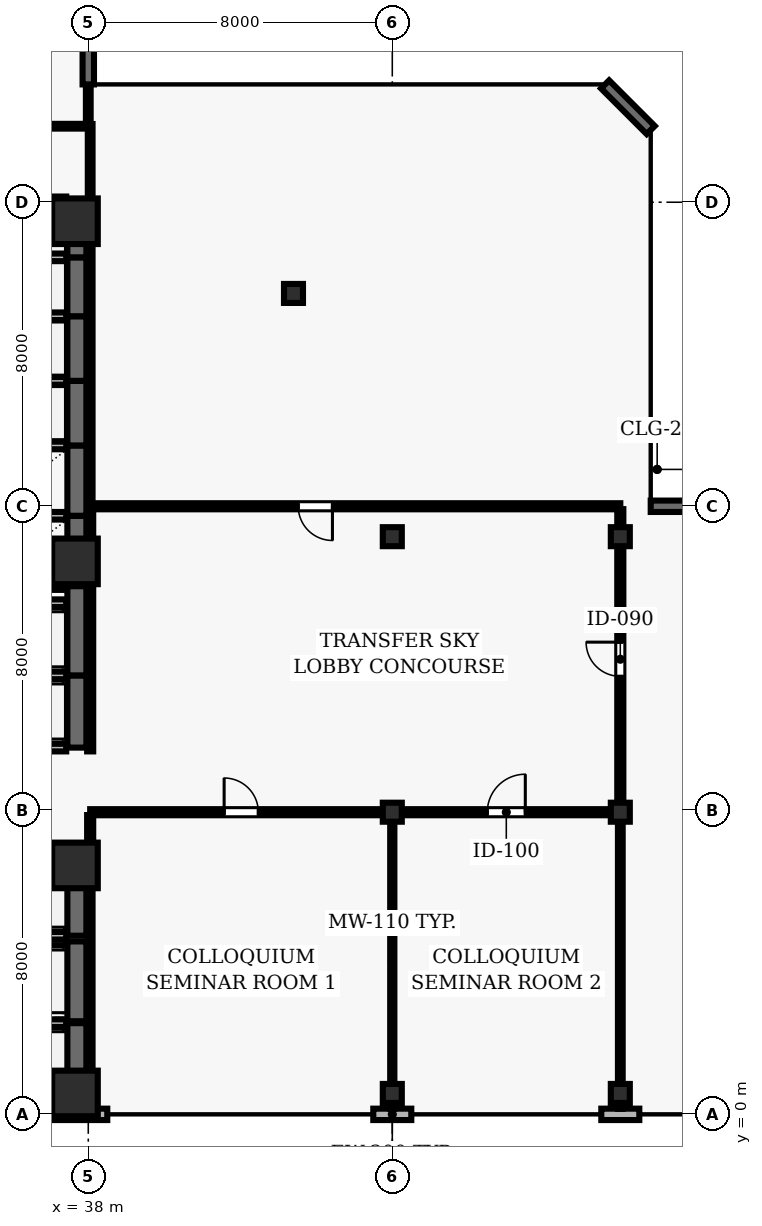
"""IFC4 building model, lengths in metres.
Left out: names, types, materials, properties, quantities, classifications, styles, units other than length and angle.
Written with IfcOpenShell. Run it as: python <this file> out.ifc"""

import sys

from ifc_helpers import new_model, si_unit, direction, frame, frame_2d, origin, origin_2d, place, context, subcontext, project, spatial, rectangle, hollow_rectangle, extrude, element, fill, save


model = new_model("IFC4")
c1 = context("Model", 3, precision=1e-05, world=origin(), true_north=direction((0.0, 1.0)))
c2 = subcontext(c1, "Body", "Model", "MODEL_VIEW")
j1 = project(units=[si_unit("LENGTHUNIT", "METRE"), si_unit("PLANEANGLEUNIT", "RADIAN")], contexts=[c1])
p1 = place(None, origin())
s1 = spatial("IfcSite", under=j1, at=p1, CompositionType="ELEMENT")
p2 = place(p1, origin())
s2 = spatial("IfcBuilding", under=s1, at=p2, CompositionType="ELEMENT")
p3 = place(p2, frame((0.0, 0.0, 98.4)))
s3 = spatial("IfcBuildingStorey", under=s2, at=p3, CompositionType="ELEMENT", Elevation=98.4)
for number, where, z_axis, x_axis in (
    (1, (37.65, 0.55, 0.0), (0.0, 0.0, 1.0), (1.0, 0.0, 0.0)),
    (2, (37.65, 6.55, 0.0), (0.0, 0.0, 1.0), (1.0, 0.0, 0.0)),
    (3, (37.65, 14.55, 0.0), (0.0, 0.0, 1.0), (1.0, 0.0, 0.0)),
    (4, (37.65, 23.5, 0.0), (0.0, 0.0, 1.0), (1.0, 0.0, 0.0)),
):
    element("IfcColumn", number, at=place(p3, frame(where, z_axis=z_axis, x_axis=x_axis)), inside=s3, PredefinedType="COLUMN", context=c2, shape_type="SweptSolid", body=[
        extrude(rectangle(XDim=1.2, YDim=1.2, at=origin_2d()), origin(), (0.0, 0.0, 1.0), 5.0),
    ])
for number, where, z_axis, x_axis in (
    (5, (46.0, 0.55, 0.0), (0.0, 0.0, 1.0), (1.0, 0.0, 0.0)),
    (6, (46.0, 7.95, 0.0), (0.0, 0.0, 1.0), (1.0, 0.0, 0.0)),
    (7, (46.0, 15.2, 0.0), (0.0, 0.0, 1.0), (1.0, 0.0, 0.0)),
    (8, (52.0, 0.55, 0.0), (0.0, 0.0, 1.0), (1.0, 0.0, 0.0)),
    (9, (52.0, 7.95, 0.0), (0.0, 0.0, 1.0), (1.0, 0.0, 0.0)),
    (10, (52.0, 15.2, 0.0), (0.0, 0.0, 1.0), (1.0, 0.0, 0.0)),
    (11, (43.4, 21.6, 0.0), (0.0, 0.0, 1.0), (1.0, 0.0, 0.0)),
):
    element("IfcColumn", number, at=place(p3, frame(where, z_axis=z_axis, x_axis=x_axis)), inside=s3, PredefinedType="COLUMN", context=c2, shape_type="SweptSolid", body=[
        extrude(hollow_rectangle(XDim=0.5, YDim=0.5, WallThickness=0.025, at=origin_2d()), origin(), (0.0, 0.0, 1.0), 5.0),
    ])
p4 = place(p3, frame((30.9, 0.0, 0.0), z_axis=(0.0, 0.0, 1.0), x_axis=(1.0, 0.0, 0.0)))
e12 = element("IfcWall", 12, at=p4, inside=s3, PredefinedType="SOLIDWALL", context=c2, shape_type="SweptSolid", body=[
    extrude(rectangle(XDim=7.6, YDim=0.3, at=frame_2d((3.8, 0.0))), origin(), (0.0, 0.0, 1.0), 4.79),
])
for number, where, z_axis, x_axis in (
    (13, (45.5, 0.0, 0.0), (0.0, 0.0, 1.0), (1.0, 0.0, 0.0)),
    (14, (51.5, 0.0, 0.0), (0.0, 0.0, 1.0), (1.0, 0.0, 0.0)),
):
    element("IfcWall", number, at=place(p3, frame(where, z_axis=z_axis, x_axis=x_axis)), inside=s3, PredefinedType="SOLIDWALL", context=c2, shape_type="SweptSolid", body=[
        extrude(rectangle(XDim=1.0, YDim=0.3, at=frame_2d((0.5, 0.0))), origin(), (0.0, 0.0, 1.0), 4.79),
    ])
p5 = place(p3, frame((68.1, 16.0, 0.0), z_axis=(0.0, 0.0, 1.0), x_axis=(-1.0, 0.0, 0.0)))
e15 = element("IfcWall", 15, at=p5, inside=s3, PredefinedType="SOLIDWALL", context=c2, shape_type="SweptSolid", body=[
    extrude(rectangle(XDim=15.3, YDim=0.3, at=frame_2d((7.65, 0.0))), origin(), (0.0, 0.0, 1.0), 4.79),
])
p6 = place(p5, frame((7.05, 0.0, 0.0)))
e16 = element("IfcOpeningElement", 16, at=p6, cuts=e15, PredefinedType="OPENING", context=c2, shape_type="SweptSolid", body=[
    extrude(rectangle(XDim=1.0, YDim=2.2, at=frame_2d((0.5, 1.1))), frame((0.0, 0.16, 0.0), z_axis=(0.0, -1.0, 0.0), x_axis=(1.0, 0.0, 0.0)), (0.0, 0.0, 1.0), 0.32),
])
p7 = place(p5, frame((2.775, 0.0, 0.9)))
e17 = element("IfcOpeningElement", 17, at=p7, cuts=e15, PredefinedType="OPENING", context=c2, shape_type="SweptSolid", body=[
    extrude(rectangle(XDim=2.1, YDim=1.6, at=frame_2d((1.05, 0.8))), frame((0.0, 0.16, 0.0), z_axis=(0.0, -1.0, 0.0), x_axis=(1.0, 0.0, 0.0)), (0.0, 0.0, 1.0), 0.32),
])
p8 = place(p5, frame((10.425, 0.0, 0.9)))
e18 = element("IfcOpeningElement", 18, at=p8, cuts=e15, PredefinedType="OPENING", context=c2, shape_type="SweptSolid", body=[
    extrude(rectangle(XDim=2.1, YDim=1.6, at=frame_2d((1.05, 0.8))), frame((0.0, 0.16, 0.0), z_axis=(0.0, -1.0, 0.0), x_axis=(1.0, 0.0, 0.0)), (0.0, 0.0, 1.0), 0.32),
])
p9 = place(p3, frame((52.8, 25.9, 0.0), z_axis=(0.0, 0.0, 1.0), x_axis=(-0.707034851297, 0.707178703759, 0.0)))
e19 = element("IfcWall", 19, at=p9, inside=s3, PredefinedType="SOLIDWALL", context=c2, shape_type="SweptSolid", body=[
    extrude(rectangle(XDim=1.697, YDim=0.3, at=frame_2d((0.849, 0.0))), origin(), (0.0, 0.0, 1.0), 4.79),
])
p10 = place(p3, frame((38.0, 27.1, 0.0), z_axis=(0.0, 0.0, 1.0), x_axis=(0.0, 1.0, 0.0)))
e20 = element("IfcWall", 20, at=p10, inside=s3, PredefinedType="SOLIDWALL", context=c2, shape_type="SweptSolid", body=[
    extrude(rectangle(XDim=19.0, YDim=0.3, at=frame_2d((9.5, 0.0))), origin(), (0.0, 0.0, 1.0), 4.79),
])
p11 = place(p10, frame((10.2, 0.0, 0.0)))
e21 = element("IfcOpeningElement", 21, at=p11, cuts=e20, PredefinedType="OPENING", context=c2, shape_type="SweptSolid", body=[
    extrude(rectangle(XDim=1.0, YDim=2.2, at=frame_2d((0.5, 1.1))), frame((0.0, 0.16, 0.0), z_axis=(0.0, -1.0, 0.0), x_axis=(1.0, 0.0, 0.0)), (0.0, 0.0, 1.0), 0.32),
])
p12 = place(p10, frame((14.633, 0.0, 0.9)))
e22 = element("IfcOpeningElement", 22, at=p12, cuts=e20, PredefinedType="OPENING", context=c2, shape_type="SweptSolid", body=[
    extrude(rectangle(XDim=2.4, YDim=1.8, at=frame_2d((1.2, 0.9))), frame((0.0, 0.16, 0.0), z_axis=(0.0, -1.0, 0.0), x_axis=(1.0, 0.0, 0.0)), (0.0, 0.0, 1.0), 0.32),
])
p13 = place(p3, frame((37.7, 0.3, 0.0), z_axis=(0.0, 0.0, 1.0), x_axis=(0.0, 1.0, 0.0)))
e23 = element("IfcWall", 23, at=p13, inside=s3, PredefinedType="SHEAR", context=c2, shape_type="SweptSolid", body=[
    extrude(rectangle(XDim=2.1, YDim=0.5, at=frame_2d((1.05, 0.0))), origin(), (0.0, 0.0, 1.0), 4.79),
])
for number, where, z_axis, x_axis in (
    (24, (35.28, 0.3, 0.0), (0.0, 0.0, 1.0), (1.0, 0.0, 0.0)),
    (25, (37.42, 2.4, 0.0), (0.0, 0.0, 1.0), (-1.0, 0.0, 0.0)),
):
    element("IfcWall", number, at=place(p3, frame(where, z_axis=z_axis, x_axis=x_axis)), inside=s3, PredefinedType="SOLIDWALL", context=c2, shape_type="SweptSolid", body=[
        extrude(rectangle(XDim=2.14, YDim=0.2, at=frame_2d((1.07, 0.0))), origin(), (0.0, 0.0, 1.0), 4.79),
    ])
p14 = place(p3, frame((37.7, 2.45, 0.0), z_axis=(0.0, 0.0, 1.0), x_axis=(0.0, 1.0, 0.0)))
e26 = element("IfcWall", 26, at=p14, inside=s3, PredefinedType="SHEAR", context=c2, shape_type="SweptSolid", body=[
    extrude(rectangle(XDim=2.1, YDim=0.5, at=frame_2d((1.05, 0.0))), origin(), (0.0, 0.0, 1.0), 4.79),
])
p15 = place(p3, frame((37.42, 4.55, 0.0), z_axis=(0.0, 0.0, 1.0), x_axis=(-1.0, 0.0, 0.0)))
e27 = element("IfcWall", 27, at=p15, inside=s3, PredefinedType="SOLIDWALL", context=c2, shape_type="SweptSolid", body=[
    extrude(rectangle(XDim=2.14, YDim=0.2, at=frame_2d((1.07, 0.0))), origin(), (0.0, 0.0, 1.0), 4.79),
])
p16 = place(p3, frame((37.7, 4.7, 0.0), z_axis=(0.0, 0.0, 1.0), x_axis=(0.0, 1.0, 0.0)))
e28 = element("IfcWall", 28, at=p16, inside=s3, PredefinedType="SHEAR", context=c2, shape_type="SweptSolid", body=[
    extrude(rectangle(XDim=2.25, YDim=0.5, at=frame_2d((1.125, 0.0))), origin(), (0.0, 0.0, 1.0), 4.79),
])
for number, where, z_axis, x_axis in (
    (29, (35.28, 4.7, 0.0), (0.0, 0.0, 1.0), (1.0, 0.0, 0.0)),
    (30, (37.42, 6.95, 0.0), (0.0, 0.0, 1.0), (-1.0, 0.0, 0.0)),
):
    element("IfcWall", number, at=place(p3, frame(where, z_axis=z_axis, x_axis=x_axis)), inside=s3, PredefinedType="SOLIDWALL", context=c2, shape_type="SweptSolid", body=[
        extrude(rectangle(XDim=2.14, YDim=0.2, at=frame_2d((1.07, 0.0))), origin(), (0.0, 0.0, 1.0), 4.79),
    ])
p17 = place(p3, frame((37.7, 9.65, 0.0), z_axis=(0.0, 0.0, 1.0), x_axis=(0.0, 1.0, 0.0)))
e31 = element("IfcWall", 31, at=p17, inside=s3, PredefinedType="SHEAR", context=c2, shape_type="SweptSolid", body=[
    extrude(rectangle(XDim=1.9, YDim=0.5, at=frame_2d((0.95, 0.0))), origin(), (0.0, 0.0, 1.0), 4.79),
])
for number, where, z_axis, x_axis in (
    (32, (35.28, 9.65, 0.0), (0.0, 0.0, 1.0), (1.0, 0.0, 0.0)),
    (33, (37.42, 11.55, 0.0), (0.0, 0.0, 1.0), (-1.0, 0.0, 0.0)),
):
    element("IfcWall", number, at=place(p3, frame(where, z_axis=z_axis, x_axis=x_axis)), inside=s3, PredefinedType="SOLIDWALL", context=c2, shape_type="SweptSolid", body=[
        extrude(rectangle(XDim=2.14, YDim=0.2, at=frame_2d((1.07, 0.0))), origin(), (0.0, 0.0, 1.0), 4.79),
    ])
p18 = place(p3, frame((37.7, 11.55, 0.0), z_axis=(0.0, 0.0, 1.0), x_axis=(0.0, 1.0, 0.0)))
e34 = element("IfcWall", 34, at=p18, inside=s3, PredefinedType="SHEAR", context=c2, shape_type="SweptSolid", body=[
    extrude(rectangle(XDim=2.35, YDim=0.5, at=frame_2d((1.175, 0.0))), origin(), (0.0, 0.0, 1.0), 4.79),
])
p19 = place(p3, frame((37.42, 13.45, 0.0), z_axis=(0.0, 0.0, 1.0), x_axis=(-1.0, 0.0, 0.0)))
e35 = element("IfcWall", 35, at=p19, inside=s3, PredefinedType="SOLIDWALL", context=c2, shape_type="SweptSolid", body=[
    extrude(rectangle(XDim=2.14, YDim=0.2, at=frame_2d((1.07, 0.0))), origin(), (0.0, 0.0, 1.0), 4.79),
])
p20 = place(p3, frame((37.7, 13.9, 0.0), z_axis=(0.0, 0.0, 1.0), x_axis=(0.0, 1.0, 0.0)))
e36 = element("IfcWall", 36, at=p20, inside=s3, PredefinedType="SHEAR", context=c2, shape_type="SweptSolid", body=[
    extrude(rectangle(XDim=1.85, YDim=0.5, at=frame_2d((0.925, 0.0))), origin(), (0.0, 0.0, 1.0), 4.79),
])
for number, where, z_axis, x_axis in (
    (37, (35.28, 13.9, 0.0), (0.0, 0.0, 1.0), (1.0, 0.0, 0.0)),
    (38, (37.42, 15.75, 0.0), (0.0, 0.0, 1.0), (-1.0, 0.0, 0.0)),
):
    element("IfcWall", number, at=place(p3, frame(where, z_axis=z_axis, x_axis=x_axis)), inside=s3, PredefinedType="SOLIDWALL", context=c2, shape_type="SweptSolid", body=[
        extrude(rectangle(XDim=2.14, YDim=0.2, at=frame_2d((1.07, 0.0))), origin(), (0.0, 0.0, 1.0), 4.79),
    ])
p21 = place(p3, frame((37.7, 15.75, 0.0), z_axis=(0.0, 0.0, 1.0), x_axis=(0.0, 1.0, 0.0)))
e39 = element("IfcWall", 39, at=p21, inside=s3, PredefinedType="SHEAR", context=c2, shape_type="SweptSolid", body=[
    extrude(rectangle(XDim=1.85, YDim=0.5, at=frame_2d((0.925, 0.0))), origin(), (0.0, 0.0, 1.0), 4.79),
])
p22 = place(p3, frame((37.42, 17.6, 0.0), z_axis=(0.0, 0.0, 1.0), x_axis=(-1.0, 0.0, 0.0)))
e40 = element("IfcWall", 40, at=p22, inside=s3, PredefinedType="SOLIDWALL", context=c2, shape_type="SweptSolid", body=[
    extrude(rectangle(XDim=2.14, YDim=0.2, at=frame_2d((1.07, 0.0))), origin(), (0.0, 0.0, 1.0), 4.79),
])
p23 = place(p3, frame((37.7, 17.6, 0.0), z_axis=(0.0, 0.0, 1.0), x_axis=(0.0, 1.0, 0.0)))
e41 = element("IfcWall", 41, at=p23, inside=s3, PredefinedType="SHEAR", context=c2, shape_type="SweptSolid", body=[
    extrude(rectangle(XDim=1.7, YDim=0.5, at=frame_2d((0.85, 0.0))), origin(), (0.0, 0.0, 1.0), 4.79),
])
p24 = place(p3, frame((37.42, 19.3, 0.0), z_axis=(0.0, 0.0, 1.0), x_axis=(-1.0, 0.0, 0.0)))
e42 = element("IfcWall", 42, at=p24, inside=s3, PredefinedType="SOLIDWALL", context=c2, shape_type="SweptSolid", body=[
    extrude(rectangle(XDim=2.14, YDim=0.2, at=frame_2d((1.07, 0.0))), origin(), (0.0, 0.0, 1.0), 4.79),
])
p25 = place(p3, frame((37.7, 19.3, 0.0), z_axis=(0.0, 0.0, 1.0), x_axis=(0.0, 1.0, 0.0)))
e43 = element("IfcWall", 43, at=p25, inside=s3, PredefinedType="SHEAR", context=c2, shape_type="SweptSolid", body=[
    extrude(rectangle(XDim=1.7, YDim=0.5, at=frame_2d((0.85, 0.0))), origin(), (0.0, 0.0, 1.0), 4.79),
])
p26 = place(p3, frame((37.42, 21.0, 0.0), z_axis=(0.0, 0.0, 1.0), x_axis=(-1.0, 0.0, 0.0)))
e44 = element("IfcWall", 44, at=p26, inside=s3, PredefinedType="SOLIDWALL", context=c2, shape_type="SweptSolid", body=[
    extrude(rectangle(XDim=2.14, YDim=0.2, at=frame_2d((1.07, 0.0))), origin(), (0.0, 0.0, 1.0), 4.79),
])
p27 = place(p3, frame((37.7, 21.0, 0.0), z_axis=(0.0, 0.0, 1.0), x_axis=(0.0, 1.0, 0.0)))
e45 = element("IfcWall", 45, at=p27, inside=s3, PredefinedType="SHEAR", context=c2, shape_type="SweptSolid", body=[
    extrude(rectangle(XDim=1.55, YDim=0.5, at=frame_2d((0.775, 0.0))), origin(), (0.0, 0.0, 1.0), 4.79),
])
p28 = place(p3, frame((37.42, 22.55, 0.0), z_axis=(0.0, 0.0, 1.0), x_axis=(-1.0, 0.0, 0.0)))
e46 = element("IfcWall", 46, at=p28, inside=s3, PredefinedType="SOLIDWALL", context=c2, shape_type="SweptSolid", body=[
    extrude(rectangle(XDim=2.14, YDim=0.2, at=frame_2d((1.07, 0.0))), origin(), (0.0, 0.0, 1.0), 4.79),
])
p29 = place(p3, frame((37.7, 22.55, 0.0), z_axis=(0.0, 0.0, 1.0), x_axis=(0.0, 1.0, 0.0)))
e47 = element("IfcWall", 47, at=p29, inside=s3, PredefinedType="SHEAR", context=c2, shape_type="SweptSolid", body=[
    extrude(rectangle(XDim=1.5, YDim=0.5, at=frame_2d((0.75, 0.0))), origin(), (0.0, 0.0, 1.0), 4.79),
])
p30 = place(p3, frame((37.42, 24.05, 0.0), z_axis=(0.0, 0.0, 1.0), x_axis=(-1.0, 0.0, 0.0)))
e48 = element("IfcWall", 48, at=p30, inside=s3, PredefinedType="SOLIDWALL", context=c2, shape_type="SweptSolid", body=[
    extrude(rectangle(XDim=2.14, YDim=0.2, at=frame_2d((1.07, 0.0))), origin(), (0.0, 0.0, 1.0), 4.79),
])
p31 = place(p3, frame((35.15, 26.0, 0.0), z_axis=(0.0, 0.0, 1.0), x_axis=(1.0, 0.0, 0.0)))
e49 = element("IfcWall", 49, at=p31, inside=s3, PredefinedType="PARTITIONING", context=c2, shape_type="SweptSolid", body=[
    extrude(rectangle(XDim=2.85, YDim=0.125, at=frame_2d((1.425, 0.0))), origin(), (0.0, 0.0, 1.0), 4.79),
])
p32 = place(p3, frame((38.05, 7.95, 0.0), z_axis=(0.0, 0.0, 1.0), x_axis=(1.0, 0.0, 0.0)))
e50 = element("IfcWall", 50, at=p32, inside=s3, PredefinedType="PARTITIONING", context=c2, shape_type="SweptSolid", body=[
    extrude(rectangle(XDim=7.95, YDim=0.16, at=frame_2d((3.975, 0.0))), origin(), (0.0, 0.0, 1.0), 4.173),
])
p33 = place(p32, frame((3.525, 0.0, 0.0)))
e51 = element("IfcOpeningElement", 51, at=p33, cuts=e50, PredefinedType="OPENING", context=c2, shape_type="SweptSolid", body=[
    extrude(rectangle(XDim=0.9, YDim=2.1, at=frame_2d((0.45, 1.05))), frame((0.0, 0.09, 0.0), z_axis=(0.0, -1.0, 0.0), x_axis=(1.0, 0.0, 0.0)), (0.0, 0.0, 1.0), 0.18),
])
p34 = place(p3, frame((46.0, 7.95, 0.0), z_axis=(0.0, 0.0, 1.0), x_axis=(1.0, 0.0, 0.0)))
e52 = element("IfcWall", 52, at=p34, inside=s3, PredefinedType="PARTITIONING", context=c2, shape_type="SweptSolid", body=[
    extrude(rectangle(XDim=6.0, YDim=0.16, at=frame_2d((3.0, 0.0))), origin(), (0.0, 0.0, 1.0), 4.173),
])
p35 = place(p34, frame((2.5, 0.0, 0.0)))
e53 = element("IfcOpeningElement", 53, at=p35, cuts=e52, PredefinedType="OPENING", context=c2, shape_type="SweptSolid", body=[
    extrude(rectangle(XDim=1.0, YDim=2.1, at=frame_2d((0.5, 1.05))), frame((0.0, 0.09, 0.0), z_axis=(0.0, -1.0, 0.0), x_axis=(1.0, 0.0, 0.0)), (0.0, 0.0, 1.0), 0.18),
])
p36 = place(p3, frame((52.0, 16.0, 0.0), z_axis=(0.0, 0.0, 1.0), x_axis=(-1.0, 0.0, 0.0)))
e54 = element("IfcWall", 54, at=p36, inside=s3, PredefinedType="PARTITIONING", context=c2, shape_type="SweptSolid", body=[
    extrude(rectangle(XDim=13.95, YDim=0.16, at=frame_2d((6.975, 0.0))), origin(), (0.0, 0.0, 1.0), 4.49),
])
p37 = place(p36, frame((7.575, 0.0, 0.0)))
e55 = element("IfcOpeningElement", 55, at=p37, cuts=e54, PredefinedType="OPENING", context=c2, shape_type="SweptSolid", body=[
    extrude(rectangle(XDim=0.9, YDim=2.1, at=frame_2d((0.45, 1.05))), frame((0.0, 0.09, 0.0), z_axis=(0.0, -1.0, 0.0), x_axis=(1.0, 0.0, 0.0)), (0.0, 0.0, 1.0), 0.18),
])
p38 = place(p3, frame((38.0, 26.058, 0.0), z_axis=(0.0, 0.0, 1.0), x_axis=(0.0, 1.0, 0.0)))
e56 = element("IfcWall", 56, at=p38, inside=s3, PredefinedType="PARTITIONING", context=c2, shape_type="SweptSolid", body=[
    extrude(rectangle(XDim=0.962, YDim=0.125, at=frame_2d((0.481, 0.0))), origin(), (0.0, 0.0, 1.0), 4.173),
])
p39 = place(p3, frame((38.05, 7.05, 0.0), z_axis=(0.0, 0.0, 1.0), x_axis=(0.0, 1.0, 0.0)))
e57 = element("IfcWall", 57, at=p39, inside=s3, PredefinedType="PARTITIONING", context=c2, shape_type="SweptSolid", body=[
    extrude(rectangle(XDim=0.825, YDim=0.16, at=frame_2d((0.413, 0.0))), origin(), (0.0, 0.0, 1.0), 4.173),
])
p40 = place(p3, frame((38.05, 7.05, 0.0), z_axis=(0.0, 0.0, 1.0), x_axis=(0.0, -1.0, 0.0)))
e58 = element("IfcWall", 58, at=p40, inside=s3, PredefinedType="PARTITIONING", context=c2, shape_type="SweptSolid", body=[
    extrude(rectangle(XDim=6.905, YDim=0.125, at=frame_2d((3.453, 0.0))), origin(), (0.0, 0.0, 1.0), 4.173),
])
p41 = place(p3, frame((38.05, 15.925, 0.0), z_axis=(0.0, 0.0, 1.0), x_axis=(0.0, -1.0, 0.0)))
e59 = element("IfcWall", 59, at=p41, inside=s3, PredefinedType="PARTITIONING", context=c2, shape_type="SweptSolid", body=[
    extrude(rectangle(XDim=6.375, YDim=0.16, at=frame_2d((3.188, 0.0))), origin(), (0.0, 0.0, 1.0), 4.173),
])
p42 = place(p3, frame((38.05, 26.058, 0.0), z_axis=(0.0, 0.0, 1.0), x_axis=(0.0, -1.0, 0.0)))
e60 = element("IfcWall", 60, at=p42, inside=s3, PredefinedType="PARTITIONING", context=c2, shape_type="SweptSolid", body=[
    extrude(rectangle(XDim=9.983, YDim=0.125, at=frame_2d((4.992, 0.0))), origin(), (0.0, 0.0, 1.0), 4.173),
])
p43 = place(p3, frame((46.0, 0.145, 0.0), z_axis=(0.0, 0.0, 1.0), x_axis=(0.0, 1.0, 0.0)))
e61 = element("IfcWall", 61, at=p43, inside=s3, PredefinedType="MOVABLE", context=c2, shape_type="SweptSolid", body=[
    extrude(rectangle(XDim=7.73, YDim=0.11, at=frame_2d((3.865, 0.0))), origin(), (0.0, 0.0, 1.0), 4.173),
])
p44 = place(p3, frame((52.0, 7.875, 0.0), z_axis=(0.0, 0.0, 1.0), x_axis=(0.0, -1.0, 0.0)))
e62 = element("IfcWall", 62, at=p44, inside=s3, PredefinedType="PARTITIONING", context=c2, shape_type="SweptSolid", body=[
    extrude(rectangle(XDim=7.73, YDim=0.125, at=frame_2d((3.865, 0.0))), origin(), (0.0, 0.0, 1.0), 4.173),
])
p45 = place(p3, frame((52.0, 8.025, 0.0), z_axis=(0.0, 0.0, 1.0), x_axis=(0.0, 1.0, 0.0)))
e63 = element("IfcWall", 63, at=p45, inside=s3, PredefinedType="PARTITIONING", context=c2, shape_type="SweptSolid", body=[
    extrude(rectangle(XDim=7.9, YDim=0.16, at=frame_2d((3.95, 0.0))), origin(), (0.0, 0.0, 1.0), 4.173),
])
p46 = place(p45, frame((3.5, 0.0, 0.0)))
e64 = element("IfcOpeningElement", 64, at=p46, cuts=e63, PredefinedType="OPENING", context=c2, shape_type="SweptSolid", body=[
    extrude(rectangle(XDim=0.9, YDim=2.1, at=frame_2d((0.45, 1.05))), frame((0.0, 0.09, 0.0), z_axis=(0.0, -1.0, 0.0), x_axis=(1.0, 0.0, 0.0)), (0.0, 0.0, 1.0), 0.18),
])
p47 = place(p46, origin())
e65 = element("IfcDoor", 65, at=p47, inside=s3, OperationType="SINGLE_SWING_RIGHT", PredefinedType="DOOR", context=c2, shape_type="SweptSolid", body=[
    extrude(rectangle(XDim=0.9, YDim=2.1, at=frame_2d((0.45, 1.05))), frame((0.0, 0.025, 0.0), z_axis=(0.0, -1.0, 0.0), x_axis=(1.0, 0.0, 0.0)), (0.0, 0.0, 1.0), 0.05),
])
fill(e64, e65)
p48 = place(p33, origin())
e66 = element("IfcDoor", 66, at=p48, inside=s3, OperationType="SINGLE_SWING_LEFT", PredefinedType="DOOR", context=c2, shape_type="SweptSolid", body=[
    extrude(rectangle(XDim=0.9, YDim=2.1, at=frame_2d((0.45, 1.05))), frame((0.0, 0.025, 0.0), z_axis=(0.0, -1.0, 0.0), x_axis=(1.0, 0.0, 0.0)), (0.0, 0.0, 1.0), 0.05),
])
fill(e51, e66)
p49 = place(p35, origin())
e67 = element("IfcDoor", 67, at=p49, inside=s3, OperationType="SINGLE_SWING_RIGHT", PredefinedType="DOOR", context=c2, shape_type="SweptSolid", body=[
    extrude(rectangle(XDim=1.0, YDim=2.1, at=frame_2d((0.5, 1.05))), frame((0.0, 0.025, 0.0), z_axis=(0.0, -1.0, 0.0), x_axis=(1.0, 0.0, 0.0)), (0.0, 0.0, 1.0), 0.05),
])
fill(e53, e67)
p50 = place(p37, origin())
e68 = element("IfcDoor", 68, at=p50, inside=s3, OperationType="SINGLE_SWING_LEFT", PredefinedType="DOOR", context=c2, shape_type="SweptSolid", body=[
    extrude(rectangle(XDim=0.9, YDim=2.1, at=frame_2d((0.45, 1.05))), frame((0.0, 0.025, 0.0), z_axis=(0.0, -1.0, 0.0), x_axis=(1.0, 0.0, 0.0)), (0.0, 0.0, 1.0), 0.05),
])
fill(e55, e68)
save(model, sys.argv[1])
